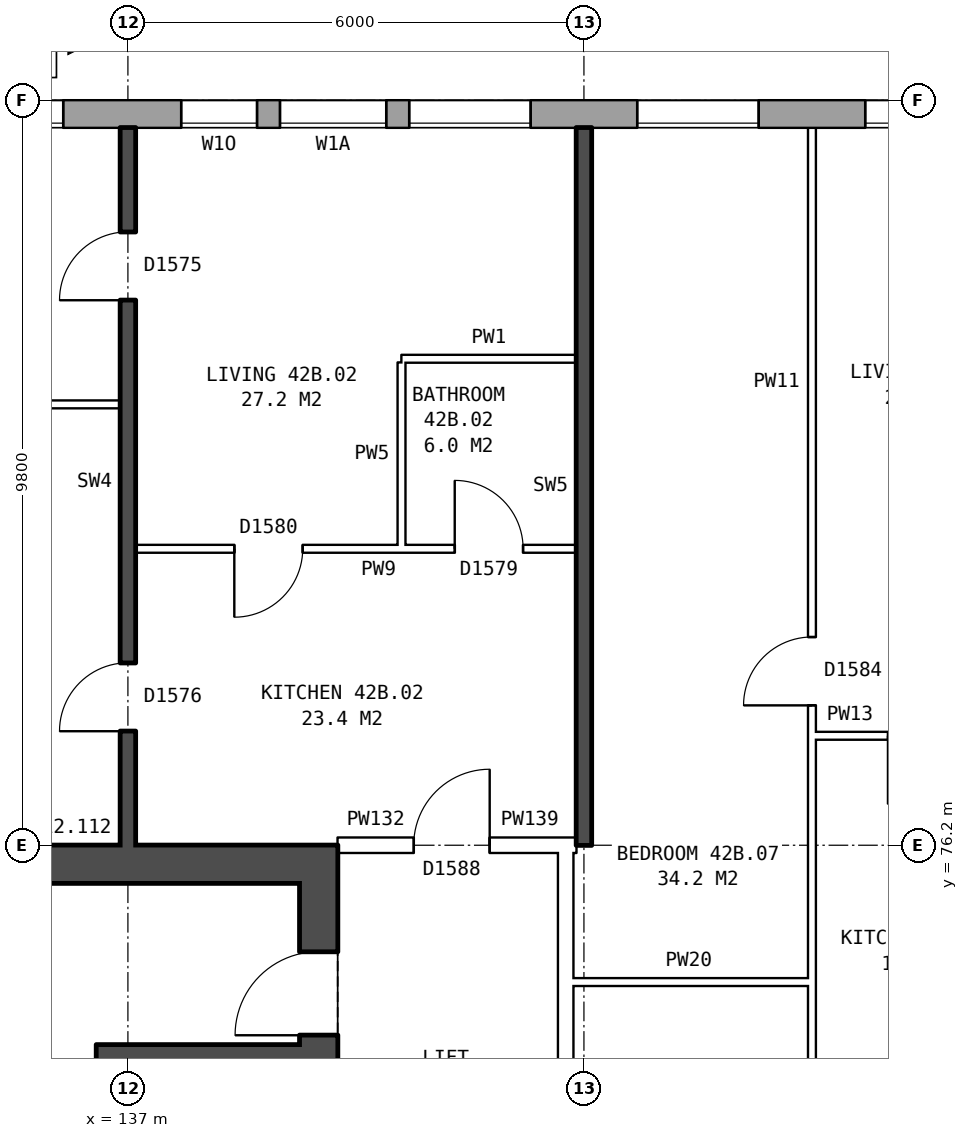
"""IFC4 building model, lengths in metres.
Left out: names, types, materials, properties, quantities, classifications, styles, units other than length and angle.
Written with IfcOpenShell. Run it as: python <this file> out.ifc"""

import sys

from ifc_helpers import new_model, si_unit, direction, frame, frame_2d, origin, place, context, subcontext, project, spatial, rectangle, extrude, element, fill, save


model = new_model("IFC4")
c1 = context("Model", 3, precision=1e-05, world=origin(), true_north=direction((0.0, 1.0)))
c2 = subcontext(c1, "Body", "Model", "MODEL_VIEW")
j1 = project(units=[si_unit("LENGTHUNIT", "METRE"), si_unit("PLANEANGLEUNIT", "RADIAN")], contexts=[c1])
p1 = place(None, origin())
s1 = spatial("IfcSite", under=j1, at=p1, CompositionType="ELEMENT")
p2 = place(p1, origin())
s2 = spatial("IfcBuilding", under=s1, at=p2, CompositionType="ELEMENT")
p3 = place(p2, frame((0.0, 0.0, 151.6)))
s3 = spatial("IfcBuildingStorey", under=s2, at=p3, CompositionType="ELEMENT", Elevation=151.6)
p4 = place(p3, frame((168.425, 85.82, 0.0), z_axis=(0.0, 0.0, 1.0), x_axis=(-1.0, 0.0, 0.0)))
e1 = element("IfcWall", 1, at=p4, inside=s3, PredefinedType="STANDARD", context=c2, shape_type="SweptSolid", body=[
    extrude(rectangle(XDim=34.351, YDim=0.36, at=frame_2d((17.175, 0.0))), origin(), (0.0, 0.0, 1.0), 2.85),
])
p5 = place(p4, frame((3.225, 0.0, 0.8)))
e2 = element("IfcOpeningElement", 2, at=p5, cuts=e1, PredefinedType="OPENING", context=c2, shape_type="SweptSolid", body=[
    extrude(rectangle(XDim=0.6, YDim=0.9, at=frame_2d((0.3, 0.45))), frame((0.0, 0.19, 0.0), z_axis=(0.0, -1.0, 0.0), x_axis=(1.0, 0.0, 0.0)), (0.0, 0.0, 1.0), 0.38),
])
p6 = place(p4, frame((5.125, 0.0, 0.8)))
e3 = element("IfcOpeningElement", 3, at=p6, cuts=e1, PredefinedType="OPENING", context=c2, shape_type="SweptSolid", body=[
    extrude(rectangle(XDim=1.6, YDim=1.8, at=frame_2d((0.8, 0.9))), frame((0.0, 0.19, 0.0), z_axis=(0.0, -1.0, 0.0), x_axis=(1.0, 0.0, 0.0)), (0.0, 0.0, 1.0), 0.38),
])
p7 = place(p4, frame((8.125, 0.0, 0.8)))
e4 = element("IfcOpeningElement", 4, at=p7, cuts=e1, PredefinedType="OPENING", context=c2, shape_type="SweptSolid", body=[
    extrude(rectangle(XDim=1.6, YDim=1.8, at=frame_2d((0.8, 0.9))), frame((0.0, 0.19, 0.0), z_axis=(0.0, -1.0, 0.0), x_axis=(1.0, 0.0, 0.0)), (0.0, 0.0, 1.0), 0.38),
])
p8 = place(p4, frame((11.125, 0.0, 0.8)))
e5 = element("IfcOpeningElement", 5, at=p8, cuts=e1, PredefinedType="OPENING", context=c2, shape_type="SweptSolid", body=[
    extrude(rectangle(XDim=1.6, YDim=1.8, at=frame_2d((0.8, 0.9))), frame((0.0, 0.19, 0.0), z_axis=(0.0, -1.0, 0.0), x_axis=(1.0, 0.0, 0.0)), (0.0, 0.0, 1.0), 0.38),
])
p9 = place(p4, frame((14.125, 0.0, 0.8)))
e6 = element("IfcOpeningElement", 6, at=p9, cuts=e1, PredefinedType="OPENING", context=c2, shape_type="SweptSolid", body=[
    extrude(rectangle(XDim=1.6, YDim=1.8, at=frame_2d((0.8, 0.9))), frame((0.0, 0.19, 0.0), z_axis=(0.0, -1.0, 0.0), x_axis=(1.0, 0.0, 0.0)), (0.0, 0.0, 1.0), 0.38),
])
p10 = place(p4, frame((17.125, 0.0, 0.8)))
e7 = element("IfcOpeningElement", 7, at=p10, cuts=e1, PredefinedType="OPENING", context=c2, shape_type="SweptSolid", body=[
    extrude(rectangle(XDim=1.6, YDim=1.8, at=frame_2d((0.8, 0.9))), frame((0.0, 0.19, 0.0), z_axis=(0.0, -1.0, 0.0), x_axis=(1.0, 0.0, 0.0)), (0.0, 0.0, 1.0), 0.38),
])
p11 = place(p4, frame((20.125, 0.0, 0.8)))
e8 = element("IfcOpeningElement", 8, at=p11, cuts=e1, PredefinedType="OPENING", context=c2, shape_type="SweptSolid", body=[
    extrude(rectangle(XDim=1.6, YDim=1.8, at=frame_2d((0.8, 0.9))), frame((0.0, 0.19, 0.0), z_axis=(0.0, -1.0, 0.0), x_axis=(1.0, 0.0, 0.0)), (0.0, 0.0, 1.0), 0.38),
])
p12 = place(p4, frame((23.125, 0.0, 0.8)))
e9 = element("IfcOpeningElement", 9, at=p12, cuts=e1, PredefinedType="OPENING", context=c2, shape_type="SweptSolid", body=[
    extrude(rectangle(XDim=1.6, YDim=1.8, at=frame_2d((0.8, 0.9))), frame((0.0, 0.19, 0.0), z_axis=(0.0, -1.0, 0.0), x_axis=(1.0, 0.0, 0.0)), (0.0, 0.0, 1.0), 0.38),
])
p13 = place(p4, frame((26.125, 0.0, 0.8)))
e10 = element("IfcOpeningElement", 10, at=p13, cuts=e1, PredefinedType="OPENING", context=c2, shape_type="SweptSolid", body=[
    extrude(rectangle(XDim=1.6, YDim=1.8, at=frame_2d((0.8, 0.9))), frame((0.0, 0.19, 0.0), z_axis=(0.0, -1.0, 0.0), x_axis=(1.0, 0.0, 0.0)), (0.0, 0.0, 1.0), 0.38),
])
p14 = place(p4, frame((28.025, 0.0, 0.8)))
e11 = element("IfcOpeningElement", 11, at=p14, cuts=e1, PredefinedType="OPENING", context=c2, shape_type="SweptSolid", body=[
    extrude(rectangle(XDim=1.4, YDim=1.8, at=frame_2d((0.7, 0.9))), frame((0.0, 0.19, 0.0), z_axis=(0.0, -1.0, 0.0), x_axis=(1.0, 0.0, 0.0)), (0.0, 0.0, 1.0), 0.38),
])
p15 = place(p4, frame((32.275, 0.0, 1.7)))
e12 = element("IfcOpeningElement", 12, at=p15, cuts=e1, PredefinedType="OPENING", context=c2, shape_type="SweptSolid", body=[
    extrude(rectangle(XDim=0.6, YDim=0.9, at=frame_2d((0.3, 0.45))), frame((0.0, 0.19, 0.0), z_axis=(0.0, -1.0, 0.0), x_axis=(1.0, 0.0, 0.0)), (0.0, 0.0, 1.0), 0.38),
])
p16 = place(p4, frame((4.225, 0.0, 0.8)))
e13 = element("IfcOpeningElement", 13, at=p16, cuts=e1, PredefinedType="OPENING", context=c2, shape_type="SweptSolid", body=[
    extrude(rectangle(XDim=0.6, YDim=1.8, at=frame_2d((0.3, 0.9))), frame((0.0, 0.19, 0.0), z_axis=(0.0, -1.0, 0.0), x_axis=(1.0, 0.0, 0.0)), (0.0, 0.0, 1.0), 0.38),
])
p17 = place(p4, frame((29.725, 0.0, 0.8)))
e14 = element("IfcOpeningElement", 14, at=p17, cuts=e1, PredefinedType="OPENING", context=c2, shape_type="SweptSolid", body=[
    extrude(rectangle(XDim=1.0, YDim=1.2, at=frame_2d((0.5, 0.6))), frame((0.0, 0.19, 0.0), z_axis=(0.0, -1.0, 0.0), x_axis=(1.0, 0.0, 0.0)), (0.0, 0.0, 1.0), 0.38),
])
p18 = place(p4, frame((33.225, 0.0, 0.8)))
e15 = element("IfcOpeningElement", 15, at=p18, cuts=e1, PredefinedType="OPENING", context=c2, shape_type="SweptSolid", body=[
    extrude(rectangle(XDim=0.8, YDim=1.8, at=frame_2d((0.4, 0.9))), frame((0.0, 0.19, 0.0), z_axis=(0.0, -1.0, 0.0), x_axis=(1.0, 0.0, 0.0)), (0.0, 0.0, 1.0), 0.38),
])
p19 = place(p3, frame((139.51, 63.8, 0.0), z_axis=(0.0, 0.0, 1.0), x_axis=(0.0, 1.0, 0.0)))
e16 = element("IfcWall", 16, at=p19, inside=s3, PredefinedType="SHEAR", context=c2, shape_type="SweptSolid", body=[
    extrude(rectangle(XDim=12.4, YDim=0.5, at=frame_2d((6.2, 0.0))), origin(), (0.0, 0.0, 1.0), 2.85),
])
p20 = place(p19, frame((1.325, 0.0, 0.0)))
e17 = element("IfcOpeningElement", 17, at=p20, cuts=e16, PredefinedType="OPENING", context=c2, shape_type="SweptSolid", body=[
    extrude(rectangle(XDim=1.1, YDim=2.1, at=frame_2d((0.55, 1.05))), frame((0.0, 0.26, 0.0), z_axis=(0.0, -1.0, 0.0), x_axis=(1.0, 0.0, 0.0)), (0.0, 0.0, 1.0), 0.52),
])
p21 = place(p19, frame((3.6, 0.0, 0.0)))
e18 = element("IfcOpeningElement", 18, at=p21, cuts=e16, PredefinedType="OPENING", context=c2, shape_type="SweptSolid", body=[
    extrude(rectangle(XDim=1.1, YDim=2.1, at=frame_2d((0.55, 1.05))), frame((0.0, 0.26, 0.0), z_axis=(0.0, -1.0, 0.0), x_axis=(1.0, 0.0, 0.0)), (0.0, 0.0, 1.0), 0.52),
])
p22 = place(p19, frame((5.8, 0.0, 0.0)))
e19 = element("IfcOpeningElement", 19, at=p22, cuts=e16, PredefinedType="OPENING", context=c2, shape_type="SweptSolid", body=[
    extrude(rectangle(XDim=1.1, YDim=2.1, at=frame_2d((0.55, 1.05))), frame((0.0, 0.26, 0.0), z_axis=(0.0, -1.0, 0.0), x_axis=(1.0, 0.0, 0.0)), (0.0, 0.0, 1.0), 0.52),
])
p23 = place(p19, frame((9.9, 0.0, 0.0)))
e20 = element("IfcOpeningElement", 20, at=p23, cuts=e16, PredefinedType="OPENING", context=c2, shape_type="SweptSolid", body=[
    extrude(rectangle(XDim=1.1, YDim=2.1, at=frame_2d((0.55, 1.05))), frame((0.0, 0.26, 0.0), z_axis=(0.0, -1.0, 0.0), x_axis=(1.0, 0.0, 0.0)), (0.0, 0.0, 1.0), 0.52),
])
p24 = place(p19, frame((8.125, 0.0, 0.0)))
e21 = element("IfcOpeningElement", 21, at=p24, cuts=e16, PredefinedType="OPENING", context=c2, shape_type="SweptSolid", body=[
    extrude(rectangle(XDim=0.85, YDim=2.1, at=frame_2d((0.425, 1.05))), frame((0.0, 0.26, 0.0), z_axis=(0.0, -1.0, 0.0), x_axis=(1.0, 0.0, 0.0)), (0.0, 0.0, 1.0), 0.52),
])
p25 = place(p3, frame((139.26, 75.95, 0.0), z_axis=(0.0, 0.0, 1.0), x_axis=(-1.0, 0.0, 0.0)))
e22 = element("IfcWall", 22, at=p25, inside=s3, PredefinedType="SHEAR", context=c2, shape_type="SweptSolid", body=[
    extrude(rectangle(XDim=7.4, YDim=0.5, at=frame_2d((3.7, 0.0))), origin(), (0.0, 0.0, 1.0), 2.85),
])
p26 = place(p3, frame((139.26, 73.45, 0.0), z_axis=(0.0, 0.0, 1.0), x_axis=(-1.0, 0.0, 0.0)))
e23 = element("IfcWall", 23, at=p26, inside=s3, PredefinedType="SHEAR", context=c2, shape_type="SweptSolid", body=[
    extrude(rectangle(XDim=2.425, YDim=0.25, at=frame_2d((1.212, 0.0))), origin(), (0.0, 0.0, 1.0), 2.85),
])
p27 = place(p3, frame((136.71, 71.375, 0.0), z_axis=(0.0, 0.0, 1.0), x_axis=(0.0, 1.0, 0.0)))
e24 = element("IfcWall", 24, at=p27, inside=s3, PredefinedType="SHEAR", context=c2, shape_type="SweptSolid", body=[
    extrude(rectangle(XDim=2.2, YDim=0.25, at=frame_2d((1.1, 0.0))), origin(), (0.0, 0.0, 1.0), 2.85),
])
p28 = place(p3, frame((142.76, 63.9, 0.0), z_axis=(0.0, 0.0, 1.0), x_axis=(0.0, 1.0, 0.0)))
e25 = element("IfcWall", 25, at=p28, inside=s3, PredefinedType="PARTITIONING", context=c2, shape_type="SweptSolid", body=[
    extrude(rectangle(XDim=12.2, YDim=0.2, at=frame_2d((6.1, 0.0))), origin(), (0.0, 0.0, 1.0), 2.85),
])
p29 = place(p28, frame((5.1, 0.0, 0.0)))
e26 = element("IfcOpeningElement", 26, at=p29, cuts=e25, PredefinedType="OPENING", context=c2, shape_type="SweptSolid", body=[
    extrude(rectangle(XDim=2.0, YDim=2.1, at=frame_2d((1.0, 1.05))), frame((0.0, 0.11, 0.0), z_axis=(0.0, -1.0, 0.0), x_axis=(1.0, 0.0, 0.0)), (0.0, 0.0, 1.0), 0.22),
])
p30 = place(p3, frame((142.76, 74.4, 0.0), z_axis=(0.0, 0.0, 1.0), x_axis=(1.0, 0.0, 0.0)))
e27 = element("IfcWall", 27, at=p30, inside=s3, PredefinedType="PARTITIONING", context=c2, shape_type="SweptSolid", body=[
    extrude(rectangle(XDim=3.24, YDim=0.1, at=frame_2d((1.62, 0.0))), origin(), (0.0, 0.0, 1.0), 2.85),
])
p31 = place(p3, frame((139.76, 76.2, 0.0), z_axis=(0.0, 0.0, 1.0), x_axis=(1.0, 0.0, 0.0)))
e28 = element("IfcWall", 28, at=p31, inside=s3, PredefinedType="PARTITIONING", context=c2, shape_type="SweptSolid", body=[
    extrude(rectangle(XDim=3.0, YDim=0.2, at=frame_2d((1.5, 0.0))), origin(), (0.0, 0.0, 1.0), 2.85),
])
p32 = place(p31, frame((1.0, 0.0, 0.0)))
e29 = element("IfcOpeningElement", 29, at=p32, cuts=e28, PredefinedType="OPENING", context=c2, shape_type="SweptSolid", body=[
    extrude(rectangle(XDim=1.0, YDim=2.1, at=frame_2d((0.5, 1.05))), frame((0.0, 0.11, 0.0), z_axis=(0.0, -1.0, 0.0), x_axis=(1.0, 0.0, 0.0)), (0.0, 0.0, 1.0), 0.22),
])
p33 = place(p3, frame((142.76, 76.2, 0.0), z_axis=(0.0, 0.0, 1.0), x_axis=(1.0, 0.0, 0.0)))
e30 = element("IfcWall", 30, at=p33, inside=s3, PredefinedType="PARTITIONING", context=c2, shape_type="SweptSolid", body=[
    extrude(rectangle(XDim=0.14, YDim=0.2, at=frame_2d((0.07, 0.0))), origin(), (0.0, 0.0, 1.0), 2.85),
])
p34 = place(p3, frame((146.0, 77.64, 0.0), z_axis=(0.0, 0.0, 1.0), x_axis=(1.0, 0.0, 0.0)))
e31 = element("IfcWall", 31, at=p34, inside=s3, PredefinedType="PARTITIONING", context=c2, shape_type="SweptSolid", body=[
    extrude(rectangle(XDim=2.9, YDim=0.1, at=frame_2d((1.45, 0.0))), origin(), (0.0, 0.0, 1.0), 2.85),
])
p35 = place(p34, frame((1.0, 0.0, 0.0)))
e32 = element("IfcOpeningElement", 32, at=p35, cuts=e31, PredefinedType="OPENING", context=c2, shape_type="SweptSolid", body=[
    extrude(rectangle(XDim=0.9, YDim=2.1, at=frame_2d((0.45, 1.05))), frame((0.0, 0.06, 0.0), z_axis=(0.0, -1.0, 0.0), x_axis=(1.0, 0.0, 0.0)), (0.0, 0.0, 1.0), 0.12),
])
p36 = place(p3, frame((137.1, 80.1, 0.0), z_axis=(0.0, 0.0, 1.0), x_axis=(1.0, 0.0, 0.0)))
e33 = element("IfcWall", 33, at=p36, inside=s3, PredefinedType="PARTITIONING", context=c2, shape_type="SweptSolid", body=[
    extrude(rectangle(XDim=5.8, YDim=0.1, at=frame_2d((2.9, 0.0))), origin(), (0.0, 0.0, 1.0), 2.85),
])
p37 = place(p36, frame((1.3, 0.0, 0.0)))
e34 = element("IfcOpeningElement", 34, at=p37, cuts=e33, PredefinedType="OPENING", context=c2, shape_type="SweptSolid", body=[
    extrude(rectangle(XDim=0.9, YDim=2.1, at=frame_2d((0.45, 1.05))), frame((0.0, 0.06, 0.0), z_axis=(0.0, -1.0, 0.0), x_axis=(1.0, 0.0, 0.0)), (0.0, 0.0, 1.0), 0.12),
])
p38 = place(p36, frame((4.2, 0.0, 0.0)))
e35 = element("IfcOpeningElement", 35, at=p38, cuts=e33, PredefinedType="OPENING", context=c2, shape_type="SweptSolid", body=[
    extrude(rectangle(XDim=0.9, YDim=2.1, at=frame_2d((0.45, 1.05))), frame((0.0, 0.06, 0.0), z_axis=(0.0, -1.0, 0.0), x_axis=(1.0, 0.0, 0.0)), (0.0, 0.0, 1.0), 0.12),
])
p39 = place(p3, frame((131.36, 82.0, 0.0), z_axis=(0.0, 0.0, 1.0), x_axis=(1.0, 0.0, 0.0)))
e36 = element("IfcWall", 36, at=p39, inside=s3, PredefinedType="PARTITIONING", context=c2, shape_type="SweptSolid", body=[
    extrude(rectangle(XDim=5.54, YDim=0.1, at=frame_2d((2.77, 0.0))), origin(), (0.0, 0.0, 1.0), 2.85),
])
p40 = place(p3, frame((140.6, 82.6, 0.0), z_axis=(0.0, 0.0, 1.0), x_axis=(1.0, 0.0, 0.0)))
e37 = element("IfcWall", 37, at=p40, inside=s3, PredefinedType="PARTITIONING", context=c2, shape_type="SweptSolid", body=[
    extrude(rectangle(XDim=2.3, YDim=0.1, at=frame_2d((1.15, 0.0))), origin(), (0.0, 0.0, 1.0), 2.85),
])
p41 = place(p3, frame((137.0, 76.2, 0.0), z_axis=(0.0, 0.0, 1.0), x_axis=(0.0, 1.0, 0.0)))
e38 = element("IfcWall", 38, at=p41, inside=s3, PredefinedType="SOLIDWALL", context=c2, shape_type="SweptSolid", body=[
    extrude(rectangle(XDim=9.44, YDim=0.2, at=frame_2d((4.72, 0.0))), origin(), (0.0, 0.0, 1.0), 2.85),
])
p42 = place(p41, frame((7.17, 0.0, 0.0)))
e39 = element("IfcOpeningElement", 39, at=p42, cuts=e38, PredefinedType="OPENING", context=c2, shape_type="SweptSolid", body=[
    extrude(rectangle(XDim=0.9, YDim=2.1, at=frame_2d((0.45, 1.05))), frame((0.0, 0.11, 0.0), z_axis=(0.0, -1.0, 0.0), x_axis=(1.0, 0.0, 0.0)), (0.0, 0.0, 1.0), 0.22),
])
p43 = place(p41, frame((1.5, 0.0, 0.0)))
e40 = element("IfcOpeningElement", 40, at=p43, cuts=e38, PredefinedType="OPENING", context=c2, shape_type="SweptSolid", body=[
    extrude(rectangle(XDim=0.9, YDim=2.1, at=frame_2d((0.45, 1.05))), frame((0.0, 0.11, 0.0), z_axis=(0.0, -1.0, 0.0), x_axis=(1.0, 0.0, 0.0)), (0.0, 0.0, 1.0), 0.22),
])
p44 = place(p3, frame((140.6, 80.15, 0.0), z_axis=(0.0, 0.0, 1.0), x_axis=(0.0, 1.0, 0.0)))
e41 = element("IfcWall", 41, at=p44, inside=s3, PredefinedType="PARTITIONING", context=c2, shape_type="SweptSolid", body=[
    extrude(rectangle(XDim=2.4, YDim=0.1, at=frame_2d((1.2, 0.0))), origin(), (0.0, 0.0, 1.0), 2.85),
])
p45 = place(p3, frame((143.0, 76.2, 0.0), z_axis=(0.0, 0.0, 1.0), x_axis=(0.0, 1.0, 0.0)))
e42 = element("IfcWall", 42, at=p45, inside=s3, PredefinedType="SOLIDWALL", context=c2, shape_type="SweptSolid", body=[
    extrude(rectangle(XDim=9.44, YDim=0.2, at=frame_2d((4.72, 0.0))), origin(), (0.0, 0.0, 1.0), 2.85),
])
p46 = place(p3, frame((146.0, 71.3, 0.0), z_axis=(0.0, 0.0, 1.0), x_axis=(0.0, 1.0, 0.0)))
e43 = element("IfcWall", 43, at=p46, inside=s3, PredefinedType="PARTITIONING", context=c2, shape_type="SweptSolid", body=[
    extrude(rectangle(XDim=14.34, YDim=0.1, at=frame_2d((7.17, 0.0))), origin(), (0.0, 0.0, 1.0), 2.85),
])
p47 = place(p46, frame((6.74, 0.0, 0.0)))
e44 = element("IfcOpeningElement", 44, at=p47, cuts=e43, PredefinedType="OPENING", context=c2, shape_type="SweptSolid", body=[
    extrude(rectangle(XDim=0.9, YDim=2.1, at=frame_2d((0.45, 1.05))), frame((0.0, 0.06, 0.0), z_axis=(0.0, -1.0, 0.0), x_axis=(1.0, 0.0, 0.0)), (0.0, 0.0, 1.0), 0.12),
])
p48 = place(p46, frame((0.4, 0.0, 0.0)))
e45 = element("IfcOpeningElement", 45, at=p48, cuts=e43, PredefinedType="OPENING", context=c2, shape_type="SweptSolid", body=[
    extrude(rectangle(XDim=0.9, YDim=2.1, at=frame_2d((0.45, 1.05))), frame((0.0, 0.06, 0.0), z_axis=(0.0, -1.0, 0.0), x_axis=(1.0, 0.0, 0.0)), (0.0, 0.0, 1.0), 0.12),
])
p49 = place(p11, origin())
e46 = element("IfcWindow", 46, at=p49, inside=s3, PartitioningType="SINGLE_PANEL", PredefinedType="WINDOW", context=c2, shape_type="SweptSolid", body=[
    extrude(rectangle(XDim=1.6, YDim=1.8, at=frame_2d((0.8, 0.9))), frame((0.0, 0.15, 0.0), z_axis=(0.0, -1.0, 0.0), x_axis=(1.0, 0.0, 0.0)), (0.0, 0.0, 1.0), 0.06),
])
fill(e8, e46)
p50 = place(p12, origin())
e47 = element("IfcWindow", 47, at=p50, inside=s3, PartitioningType="SINGLE_PANEL", PredefinedType="WINDOW", context=c2, shape_type="SweptSolid", body=[
    extrude(rectangle(XDim=1.6, YDim=1.8, at=frame_2d((0.8, 0.9))), frame((0.0, 0.15, 0.0), z_axis=(0.0, -1.0, 0.0), x_axis=(1.0, 0.0, 0.0)), (0.0, 0.0, 1.0), 0.06),
])
fill(e9, e47)
p51 = place(p13, origin())
e48 = element("IfcWindow", 48, at=p51, inside=s3, PartitioningType="SINGLE_PANEL", PredefinedType="WINDOW", context=c2, shape_type="SweptSolid", body=[
    extrude(rectangle(XDim=1.6, YDim=1.8, at=frame_2d((0.8, 0.9))), frame((0.0, 0.15, 0.0), z_axis=(0.0, -1.0, 0.0), x_axis=(1.0, 0.0, 0.0)), (0.0, 0.0, 1.0), 0.06),
])
fill(e10, e48)
p52 = place(p14, origin())
e49 = element("IfcWindow", 49, at=p52, inside=s3, PartitioningType="SINGLE_PANEL", PredefinedType="WINDOW", context=c2, shape_type="SweptSolid", body=[
    extrude(rectangle(XDim=1.4, YDim=1.8, at=frame_2d((0.7, 0.9))), frame((0.0, 0.15, 0.0), z_axis=(0.0, -1.0, 0.0), x_axis=(1.0, 0.0, 0.0)), (0.0, 0.0, 1.0), 0.06),
])
fill(e11, e49)
p53 = place(p15, origin())
e50 = element("IfcWindow", 50, at=p53, inside=s3, PartitioningType="SINGLE_PANEL", PredefinedType="WINDOW", context=c2, shape_type="SweptSolid", body=[
    extrude(rectangle(XDim=0.6, YDim=0.9, at=frame_2d((0.3, 0.45))), frame((0.0, 0.15, 0.0), z_axis=(0.0, -1.0, 0.0), x_axis=(1.0, 0.0, 0.0)), (0.0, 0.0, 1.0), 0.06),
])
fill(e12, e50)
p54 = place(p23, origin())
e51 = element("IfcDoor", 51, at=p54, inside=s3, OperationType="SINGLE_SWING_LEFT", PredefinedType="DOOR", context=c2, shape_type="SweptSolid", body=[
    extrude(rectangle(XDim=1.1, YDim=2.1, at=frame_2d((0.55, 1.05))), frame((0.0, 0.235, 0.0), z_axis=(0.0, -1.0, 0.0), x_axis=(1.0, 0.0, 0.0)), (0.0, 0.0, 1.0), 0.05),
])
fill(e20, e51)
p55 = place(p42, origin())
e52 = element("IfcDoor", 52, at=p55, inside=s3, OperationType="SINGLE_SWING_LEFT", PredefinedType="DOOR", context=c2, shape_type="SweptSolid", body=[
    extrude(rectangle(XDim=0.9, YDim=2.1, at=frame_2d((0.45, 1.05))), frame((0.0, 0.025, 0.0), z_axis=(0.0, -1.0, 0.0), x_axis=(1.0, 0.0, 0.0)), (0.0, 0.0, 1.0), 0.05),
])
fill(e39, e52)
p56 = place(p43, origin())
e53 = element("IfcDoor", 53, at=p56, inside=s3, OperationType="SINGLE_SWING_LEFT", PredefinedType="DOOR", context=c2, shape_type="SweptSolid", body=[
    extrude(rectangle(XDim=0.9, YDim=2.1, at=frame_2d((0.45, 1.05))), frame((0.0, 0.025, 0.0), z_axis=(0.0, -1.0, 0.0), x_axis=(1.0, 0.0, 0.0)), (0.0, 0.0, 1.0), 0.05),
])
fill(e40, e53)
p57 = place(p32, origin())
e54 = element("IfcDoor", 54, at=p57, inside=s3, OperationType="SINGLE_SWING_RIGHT", PredefinedType="DOOR", context=c2, shape_type="SweptSolid", body=[
    extrude(rectangle(XDim=1.0, YDim=2.1, at=frame_2d((0.5, 1.05))), frame((0.0, 0.025, 0.0), z_axis=(0.0, -1.0, 0.0), x_axis=(1.0, 0.0, 0.0)), (0.0, 0.0, 1.0), 0.05),
])
fill(e29, e54)
p58 = place(p37, frame((0.9, 0.0, 0.0), z_axis=(0.0, 0.0, 1.0), x_axis=(-1.0, 0.0, 0.0)))
e55 = element("IfcDoor", 55, at=p58, inside=s3, OperationType="SINGLE_SWING_RIGHT", PredefinedType="DOOR", context=c2, shape_type="SweptSolid", body=[
    extrude(rectangle(XDim=0.9, YDim=2.1, at=frame_2d((0.45, 1.05))), frame((0.0, 0.025, 0.0), z_axis=(0.0, -1.0, 0.0), x_axis=(1.0, 0.0, 0.0)), (0.0, 0.0, 1.0), 0.05),
])
fill(e34, e55)
p59 = place(p38, origin())
e56 = element("IfcDoor", 56, at=p59, inside=s3, OperationType="SINGLE_SWING_LEFT", PredefinedType="DOOR", context=c2, shape_type="SweptSolid", body=[
    extrude(rectangle(XDim=0.9, YDim=2.1, at=frame_2d((0.45, 1.05))), frame((0.0, 0.025, 0.0), z_axis=(0.0, -1.0, 0.0), x_axis=(1.0, 0.0, 0.0)), (0.0, 0.0, 1.0), 0.05),
])
fill(e35, e56)
p60 = place(p47, origin())
e57 = element("IfcDoor", 57, at=p60, inside=s3, OperationType="SINGLE_SWING_LEFT", PredefinedType="DOOR", context=c2, shape_type="SweptSolid", body=[
    extrude(rectangle(XDim=0.9, YDim=2.1, at=frame_2d((0.45, 1.05))), frame((0.0, 0.025, 0.0), z_axis=(0.0, -1.0, 0.0), x_axis=(1.0, 0.0, 0.0)), (0.0, 0.0, 1.0), 0.05),
])
fill(e44, e57)
p61 = place(p17, origin())
e58 = element("IfcWindow", 58, at=p61, inside=s3, PartitioningType="SINGLE_PANEL", PredefinedType="WINDOW", context=c2, shape_type="SweptSolid", body=[
    extrude(rectangle(XDim=1.0, YDim=1.2, at=frame_2d((0.5, 0.6))), frame((0.0, 0.15, 0.0), z_axis=(0.0, -1.0, 0.0), x_axis=(1.0, 0.0, 0.0)), (0.0, 0.0, 1.0), 0.06),
])
fill(e14, e58)
save(model, sys.argv[1])
